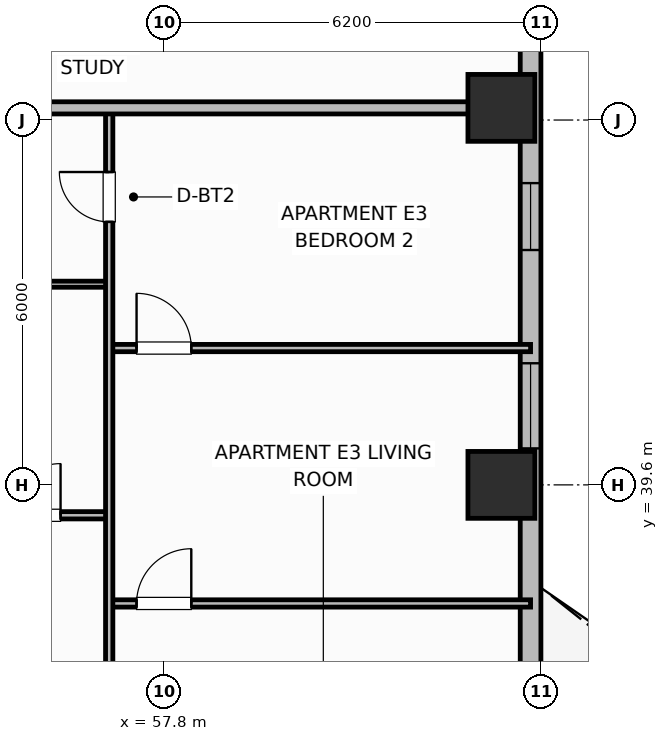
"""IFC4 building model, lengths in metres.
Left out: names, types, materials, properties, quantities, classifications, styles, units other than length and angle.
Written with IfcOpenShell. Run it as: python <this file> out.ifc"""

import sys

from ifc_helpers import new_model, si_unit, direction, frame, frame_2d, origin, origin_2d, place, context, subcontext, project, spatial, rectangle, extrude, element, fill, save


model = new_model("IFC4")
c1 = context("Model", 3, precision=1e-05, world=origin(), true_north=direction((0.0, 1.0)))
c2 = subcontext(c1, "Body", "Model", "MODEL_VIEW")
j1 = project(units=[si_unit("LENGTHUNIT", "METRE"), si_unit("PLANEANGLEUNIT", "RADIAN")], contexts=[c1])
p1 = place(None, origin())
s1 = spatial("IfcSite", under=j1, at=p1, CompositionType="ELEMENT")
p2 = place(p1, origin())
s2 = spatial("IfcBuilding", under=s1, at=p2, CompositionType="ELEMENT")
p3 = place(p2, frame((0.0, 0.0, 125.3)))
s3 = spatial("IfcBuildingStorey", under=s2, at=p3, CompositionType="ELEMENT", Elevation=125.3)
for number, where, z_axis, x_axis in (
    (1, (63.35, 39.6, 0.0), (0.0, 0.0, 1.0), (1.0, 0.0, 0.0)),
    (2, (63.35, 45.8, 0.0), (0.0, 0.0, 1.0), (1.0, 0.0, 0.0)),
):
    element("IfcColumn", number, at=place(p3, frame(where, z_axis=z_axis, x_axis=x_axis)), inside=s3, PredefinedType="COLUMN", context=c2, shape_type="SweptSolid", body=[
        extrude(rectangle(XDim=1.1, YDim=1.1, at=origin_2d()), origin(), (0.0, 0.0, 1.0), 3.7),
    ])
p4 = place(p3, frame((63.83, 32.6, 0.0), z_axis=(0.0, 0.0, 1.0), x_axis=(0.0, 1.0, 0.0)))
e3 = element("IfcWall", 3, at=p4, inside=s3, PredefinedType="SOLIDWALL", context=c2, shape_type="SweptSolid", body=[
    extrude(rectangle(XDim=14.8, YDim=0.34, at=frame_2d((7.4, 0.0))), origin(), (0.0, 0.0, 1.0), 2.7),
])
p5 = place(p4, frame((2.1, 0.0, 0.0)))
e4 = element("IfcOpeningElement", 4, at=p5, cuts=e3, PredefinedType="OPENING", context=c2, shape_type="SweptSolid", body=[
    extrude(rectangle(XDim=1.6, YDim=2.1, at=frame_2d((0.8, 1.05))), frame((0.0, 0.18, 0.0), z_axis=(0.0, -1.0, 0.0), x_axis=(1.0, 0.0, 0.0)), (0.0, 0.0, 1.0), 0.36),
])
p6 = place(p4, frame((7.6, 0.0, 0.69)))
e5 = element("IfcOpeningElement", 5, at=p6, cuts=e3, PredefinedType="OPENING", context=c2, shape_type="SweptSolid", body=[
    extrude(rectangle(XDim=1.4, YDim=1.85, at=frame_2d((0.7, 0.925))), frame((0.0, 0.18, 0.0), z_axis=(0.0, -1.0, 0.0), x_axis=(1.0, 0.0, 0.0)), (0.0, 0.0, 1.0), 0.36),
])
p7 = place(p4, frame((10.863, 0.0, 0.93)))
e6 = element("IfcOpeningElement", 6, at=p7, cuts=e3, PredefinedType="OPENING", context=c2, shape_type="SweptSolid", body=[
    extrude(rectangle(XDim=1.1, YDim=1.65, at=frame_2d((0.55, 0.825))), frame((0.0, 0.18, 0.0), z_axis=(0.0, -1.0, 0.0), x_axis=(1.0, 0.0, 0.0)), (0.0, 0.0, 1.0), 0.36),
])
p8 = place(p3, frame((54.65, 39.1, 0.0), z_axis=(0.0, 0.0, 1.0), x_axis=(1.0, 0.0, 0.0)))
e7 = element("IfcWall", 7, at=p8, inside=s3, PredefinedType="PARTITIONING", context=c2, shape_type="SweptSolid", body=[
    extrude(rectangle(XDim=2.25, YDim=0.12, at=frame_2d((1.125, 0.0))), origin(), (0.0, 0.0, 1.0), 2.53),
])
p9 = place(p8, frame((0.6, 0.0, 0.0)))
e8 = element("IfcOpeningElement", 8, at=p9, cuts=e7, PredefinedType="OPENING", context=c2, shape_type="SweptSolid", body=[
    extrude(rectangle(XDim=0.85, YDim=2.1, at=frame_2d((0.425, 1.05))), frame((0.0, 0.07, 0.0), z_axis=(0.0, -1.0, 0.0), x_axis=(1.0, 0.0, 0.0)), (0.0, 0.0, 1.0), 0.14),
])
p10 = place(p3, frame((54.65, 42.9, 0.0), z_axis=(0.0, 0.0, 1.0), x_axis=(1.0, 0.0, 0.0)))
e9 = element("IfcWall", 9, at=p10, inside=s3, PredefinedType="PARTITIONING", context=c2, shape_type="SweptSolid", body=[
    extrude(rectangle(XDim=2.25, YDim=0.1, at=frame_2d((1.125, 0.0))), origin(), (0.0, 0.0, 1.0), 2.53),
])
p11 = place(p3, frame((56.9, 37.65, 0.0), z_axis=(0.0, 0.0, 1.0), x_axis=(1.0, 0.0, 0.0)))
e10 = element("IfcWall", 10, at=p11, inside=s3, PredefinedType="PARTITIONING", context=c2, shape_type="SweptSolid", body=[
    extrude(rectangle(XDim=6.93, YDim=0.12, at=frame_2d((3.465, 0.0))), origin(), (0.0, 0.0, 1.0), 2.53),
])
p12 = place(p11, frame((0.45, 0.0, 0.0)))
e11 = element("IfcOpeningElement", 11, at=p12, cuts=e10, PredefinedType="OPENING", context=c2, shape_type="SweptSolid", body=[
    extrude(rectangle(XDim=0.9, YDim=2.1, at=frame_2d((0.45, 1.05))), frame((0.0, 0.07, 0.0), z_axis=(0.0, -1.0, 0.0), x_axis=(1.0, 0.0, 0.0)), (0.0, 0.0, 1.0), 0.14),
])
p13 = place(p3, frame((56.9, 41.85, 0.0), z_axis=(0.0, 0.0, 1.0), x_axis=(1.0, 0.0, 0.0)))
e12 = element("IfcWall", 12, at=p13, inside=s3, PredefinedType="PARTITIONING", context=c2, shape_type="SweptSolid", body=[
    extrude(rectangle(XDim=6.93, YDim=0.12, at=frame_2d((3.465, 0.0))), origin(), (0.0, 0.0, 1.0), 2.53),
])
p14 = place(p13, frame((0.45, 0.0, 0.0)))
e13 = element("IfcOpeningElement", 13, at=p14, cuts=e12, PredefinedType="OPENING", context=c2, shape_type="SweptSolid", body=[
    extrude(rectangle(XDim=0.9, YDim=2.1, at=frame_2d((0.45, 1.05))), frame((0.0, 0.07, 0.0), z_axis=(0.0, -1.0, 0.0), x_axis=(1.0, 0.0, 0.0)), (0.0, 0.0, 1.0), 0.14),
])
p15 = place(p3, frame((56.9, 33.74, 0.0), z_axis=(0.0, 0.0, 1.0), x_axis=(0.0, 1.0, 0.0)))
e14 = element("IfcWall", 14, at=p15, inside=s3, PredefinedType="PARTITIONING", context=c2, shape_type="SweptSolid", body=[
    extrude(rectangle(XDim=12.02, YDim=0.12, at=frame_2d((6.01, 0.0))), origin(), (0.0, 0.0, 1.0), 2.53),
])
p16 = place(p15, frame((0.41, 0.0, 0.0)))
e15 = element("IfcOpeningElement", 15, at=p16, cuts=e14, PredefinedType="OPENING", context=c2, shape_type="SweptSolid", body=[
    extrude(rectangle(XDim=0.9, YDim=2.1, at=frame_2d((0.45, 1.05))), frame((0.0, 0.07, 0.0), z_axis=(0.0, -1.0, 0.0), x_axis=(1.0, 0.0, 0.0)), (0.0, 0.0, 1.0), 0.14),
])
p17 = place(p15, frame((10.185, 0.0, 0.0)))
e16 = element("IfcOpeningElement", 16, at=p17, cuts=e14, PredefinedType="OPENING", context=c2, shape_type="SweptSolid", body=[
    extrude(rectangle(XDim=0.82, YDim=2.08, at=frame_2d((0.41, 1.04))), frame((0.0, 0.07, 0.0), z_axis=(0.0, -1.0, 0.0), x_axis=(1.0, 0.0, 0.0)), (0.0, 0.0, 1.0), 0.14),
])
p18 = place(p3, frame((54.65, 45.8, 0.0), z_axis=(0.0, 0.0, 1.0), x_axis=(1.0, 0.0, 0.0)))
e17 = element("IfcWall", 17, at=p18, inside=s3, PredefinedType="PARTITIONING", context=c2, shape_type="SweptSolid", body=[
    extrude(rectangle(XDim=8.76, YDim=0.2, at=frame_2d((4.38, 0.0))), origin(), (0.0, 0.0, 1.0), 2.53),
])
p19 = place(p6, origin())
e18 = element("IfcWindow", 18, at=p19, inside=s3, PartitioningType="SINGLE_PANEL", PredefinedType="WINDOW", context=c2, shape_type="SweptSolid", body=[
    extrude(rectangle(XDim=1.4, YDim=1.85, at=frame_2d((0.7, 0.925))), frame((0.0, 0.03, 0.0), z_axis=(0.0, -1.0, 0.0), x_axis=(1.0, 0.0, 0.0)), (0.0, 0.0, 1.0), 0.06),
])
fill(e5, e18)
p20 = place(p7, origin())
e19 = element("IfcWindow", 19, at=p20, inside=s3, PartitioningType="SINGLE_PANEL", PredefinedType="WINDOW", context=c2, shape_type="SweptSolid", body=[
    extrude(rectangle(XDim=1.1, YDim=1.65, at=frame_2d((0.55, 0.825))), frame((0.0, 0.03, 0.0), z_axis=(0.0, -1.0, 0.0), x_axis=(1.0, 0.0, 0.0)), (0.0, 0.0, 1.0), 0.06),
])
fill(e6, e19)
p21 = place(p9, origin())
e20 = element("IfcDoor", 20, at=p21, inside=s3, OperationType="SINGLE_SWING_RIGHT", PredefinedType="DOOR", context=c2, shape_type="SweptSolid", body=[
    extrude(rectangle(XDim=0.85, YDim=2.1, at=frame_2d((0.425, 1.05))), frame((0.0, 0.025, 0.0), z_axis=(0.0, -1.0, 0.0), x_axis=(1.0, 0.0, 0.0)), (0.0, 0.0, 1.0), 0.05),
])
fill(e8, e20)
p22 = place(p12, origin())
e21 = element("IfcDoor", 21, at=p22, inside=s3, OperationType="SINGLE_SWING_RIGHT", PredefinedType="DOOR", context=c2, shape_type="SweptSolid", body=[
    extrude(rectangle(XDim=0.9, YDim=2.1, at=frame_2d((0.45, 1.05))), frame((0.0, 0.025, 0.0), z_axis=(0.0, -1.0, 0.0), x_axis=(1.0, 0.0, 0.0)), (0.0, 0.0, 1.0), 0.05),
])
fill(e11, e21)
p23 = place(p14, origin())
e22 = element("IfcDoor", 22, at=p23, inside=s3, OperationType="SINGLE_SWING_LEFT", PredefinedType="DOOR", context=c2, shape_type="SweptSolid", body=[
    extrude(rectangle(XDim=0.9, YDim=2.1, at=frame_2d((0.45, 1.05))), frame((0.0, 0.025, 0.0), z_axis=(0.0, -1.0, 0.0), x_axis=(1.0, 0.0, 0.0)), (0.0, 0.0, 1.0), 0.05),
])
fill(e13, e22)
p24 = place(p17, origin())
e23 = element("IfcDoor", 23, at=p24, inside=s3, OperationType="SINGLE_SWING_RIGHT", PredefinedType="DOOR", context=c2, shape_type="SweptSolid", body=[
    extrude(rectangle(XDim=0.82, YDim=2.08, at=frame_2d((0.41, 1.04))), frame((0.0, 0.025, 0.0), z_axis=(0.0, -1.0, 0.0), x_axis=(1.0, 0.0, 0.0)), (0.0, 0.0, 1.0), 0.05),
])
fill(e16, e23)
save(model, sys.argv[1])
